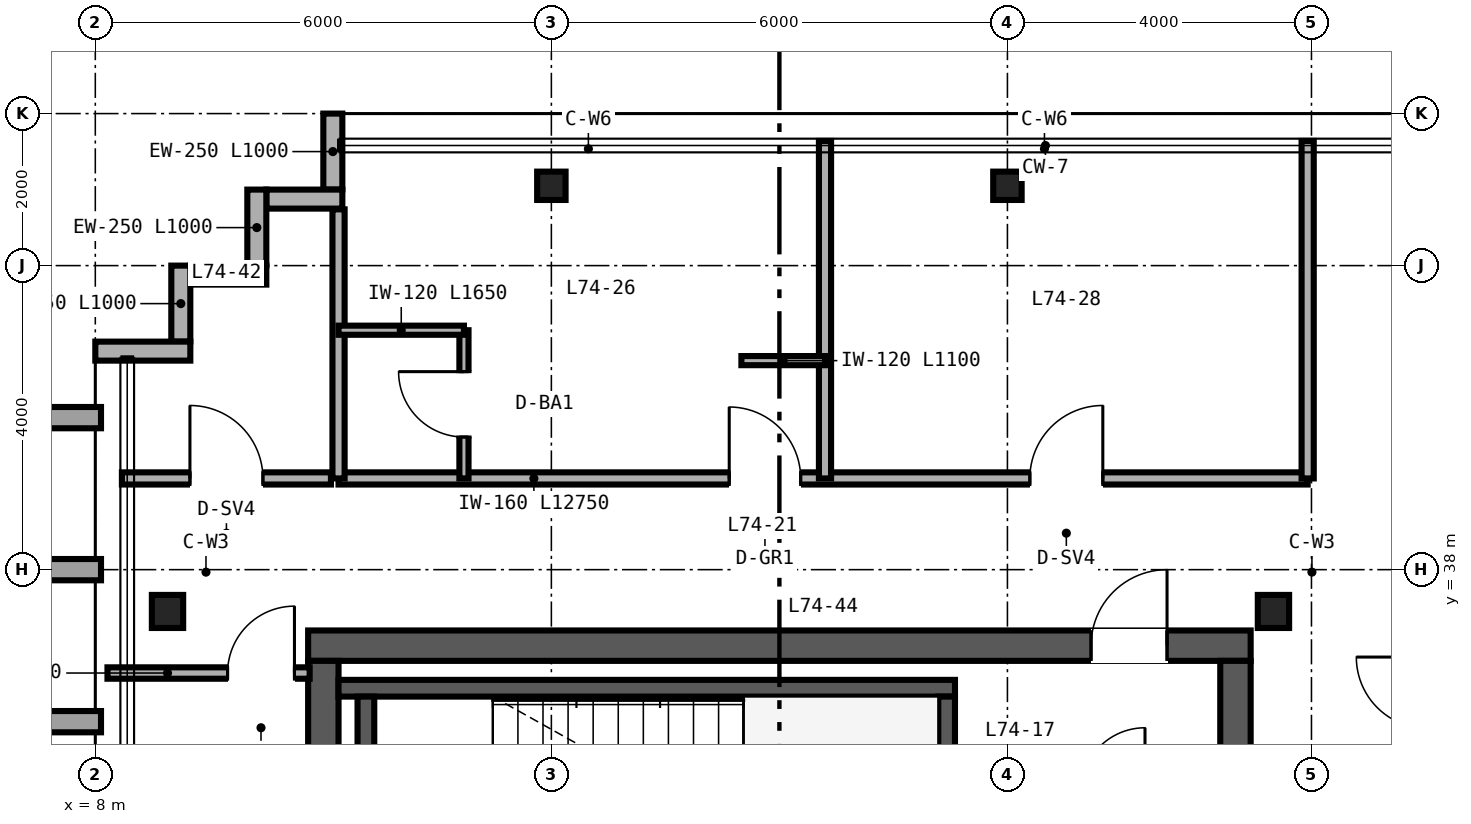
"""IFC4 building model, lengths in metres.
Left out: names, types, materials, properties, quantities, classifications, styles, units other than length and angle.
Written with IfcOpenShell. Run it as: python <this file> out.ifc"""

import sys

from ifc_helpers import new_model, si_unit, direction, frame, frame_2d, origin, origin_2d, place, context, subcontext, project, spatial, rectangle, i_section, extrude, source, transform, mapped, element, fill, save


model = new_model("IFC4")
c1 = context("Model", 3, precision=1e-05, world=origin(), true_north=direction((0.0, 1.0)))
c2 = subcontext(c1, "Body", "Model", "MODEL_VIEW")
j1 = project(units=[si_unit("LENGTHUNIT", "METRE"), si_unit("PLANEANGLEUNIT", "RADIAN")], contexts=[c1])
p1 = place(None, origin())
s1 = spatial("IfcSite", under=j1, at=p1, CompositionType="ELEMENT")
p2 = place(p1, origin())
s2 = spatial("IfcBuilding", under=s1, at=p2, CompositionType="ELEMENT")
p3 = place(p2, frame((0.0, 0.0, 290.4)))
s3 = spatial("IfcBuildingStorey", under=s2, at=p3, CompositionType="ELEMENT", Elevation=290.4)
p4 = place(p3, frame((10.8, 37.0, 0.0), z_axis=(0.0, 0.0, 1.0), x_axis=(1.0, 0.0, 0.0)))
e1 = element("IfcWall", 1, at=p4, inside=s3, PredefinedType="SHEAR", context=c2, shape_type="SweptSolid", body=[
    extrude(rectangle(XDim=12.4, YDim=0.4, at=frame_2d((6.2, 0.0))), origin(), (0.0, 0.0, 1.0), 3.38),
])
p5 = place(p4, frame((10.3, 0.0, 0.0)))
e2 = element("IfcOpeningElement", 2, at=p5, cuts=e1, PredefinedType="OPENING", context=c2, shape_type="SweptSolid", body=[
    extrude(rectangle(XDim=1.0, YDim=2.15, at=frame_2d((0.5, 1.075))), frame((0.0, 0.21, 0.0), z_axis=(0.0, -1.0, 0.0), x_axis=(1.0, 0.0, 0.0)), (0.0, 0.0, 1.0), 0.42),
])
for number, where, z_axis, x_axis in (
    (3, (11.0, 15.2, 0.0), (0.0, 0.0, 1.0), (0.0, 1.0, 0.0)),
    (4, (23.0, 15.2, 0.0), (0.0, 0.0, 1.0), (0.0, 1.0, 0.0)),
):
    element("IfcWall", number, at=place(p3, frame(where, z_axis=z_axis, x_axis=x_axis)), inside=s3, PredefinedType="SHEAR", context=c2, shape_type="SweptSolid", body=[
        extrude(rectangle(XDim=21.6, YDim=0.4, at=frame_2d((10.8, 0.0))), origin(), (0.0, 0.0, 1.0), 3.38),
    ])
p6 = place(p3, frame((11.2, 36.44, 0.0), z_axis=(0.0, 0.0, 1.0), x_axis=(1.0, 0.0, 0.0)))
e5 = element("IfcWall", 5, at=p6, inside=s3, PredefinedType="SHEAR", context=c2, shape_type="SweptSolid", body=[
    extrude(rectangle(XDim=8.11, YDim=0.22, at=frame_2d((4.055, 0.0))), origin(), (0.0, 0.0, 1.0), 3.4),
])
for number, where, z_axis, x_axis in (
    (6, (11.56, 33.05, 0.0), (0.0, 0.0, 1.0), (0.0, 1.0, 0.0)),
    (7, (19.2, 33.05, 0.0), (0.0, 0.0, 1.0), (0.0, 1.0, 0.0)),
):
    element("IfcWall", number, at=place(p3, frame(where, z_axis=z_axis, x_axis=x_axis)), inside=s3, PredefinedType="SHEAR", context=c2, shape_type="SweptSolid", body=[
        extrude(rectangle(XDim=3.28, YDim=0.22, at=frame_2d((1.64, 0.0))), origin(), (0.0, 0.0, 1.0), 3.4),
    ])
m1 = source(origin(), c2, "Body", "SweptSolid", [
    extrude(i_section(OverallWidth=0.412, OverallDepth=0.435, WebThickness=0.036, FlangeThickness=0.057, FilletRadius=0.025, at=origin_2d()), origin(), (0.0, 0.0, 1.0), 3.38),
])
for number, where, z_axis, x_axis in (
    (8, (8.95, 37.45, 0.0), (0.0, 0.0, 1.0), (1.0, 0.0, 0.0)),
    (9, (23.5, 37.45, 0.0), (0.0, 0.0, 1.0), (1.0, 0.0, 0.0)),
):
    element("IfcColumn", number, at=place(p3, frame(where, z_axis=z_axis, x_axis=x_axis)), inside=s3, PredefinedType="COLUMN", context=c2, shape_type="MappedRepresentation", body=[
        mapped(m1, transform((0.0, 0.0, 0.0), scale=1.0)),
    ])
m2 = source(origin(), c2, "Body", "SweptSolid", [
    extrude(i_section(OverallWidth=0.374, OverallDepth=0.373, WebThickness=0.016, FlangeThickness=0.026, FilletRadius=0.025, at=origin_2d()), origin(), (0.0, 0.0, 1.0), 3.38),
])
for number, where, z_axis, x_axis in (
    (10, (14.0, 43.05, 0.0), (0.0, 0.0, 1.0), (1.0, 0.0, 0.0)),
    (11, (20.0, 43.05, 0.0), (0.0, 0.0, 1.0), (1.0, 0.0, 0.0)),
):
    element("IfcColumn", number, at=place(p3, frame(where, z_axis=z_axis, x_axis=x_axis)), inside=s3, PredefinedType="COLUMN", context=c2, shape_type="MappedRepresentation", body=[
        mapped(m2, transform((0.0, 0.0, 0.0), scale=1.0)),
    ])
for number, where, z_axis, x_axis in (
    (12, (11.125, 44.0, 0.0), (0.0, 0.0, 1.0), (0.0, -1.0, 0.0)),
    (13, (11.25, 42.875, 0.0), (0.0, 0.0, 1.0), (-1.0, 0.0, 0.0)),
    (14, (10.125, 43.0, 0.0), (0.0, 0.0, 1.0), (0.0, -1.0, 0.0)),
    (15, (10.25, 41.875, 0.0), (0.0, 0.0, 1.0), (-1.0, 0.0, 0.0)),
    (16, (9.125, 42.0, 0.0), (0.0, 0.0, 1.0), (0.0, -1.0, 0.0)),
):
    element("IfcWall", number, at=place(p3, frame(where, z_axis=z_axis, x_axis=x_axis)), inside=s3, PredefinedType="SOLIDWALL", context=c2, shape_type="SweptSolid", body=[
        extrude(rectangle(XDim=1.0, YDim=0.25, at=frame_2d((0.5, 0.0))), origin(), (0.0, 0.0, 1.0), 3.38),
    ])
p7 = place(p3, frame((9.25, 40.875, 0.0), z_axis=(0.0, 0.0, 1.0), x_axis=(-1.0, 0.0, 0.0)))
e17 = element("IfcWall", 17, at=p7, inside=s3, PredefinedType="SOLIDWALL", context=c2, shape_type="SweptSolid", body=[
    extrude(rectangle(XDim=1.25, YDim=0.25, at=frame_2d((0.625, 0.0))), origin(), (0.0, 0.0, 1.0), 3.38),
])
p8 = place(p3, frame((11.2, 39.2, 0.0), z_axis=(0.0, 0.0, 1.0), x_axis=(1.0, 0.0, 0.0)))
e18 = element("IfcWall", 18, at=p8, inside=s3, PredefinedType="PARTITIONING", context=c2, shape_type="SweptSolid", body=[
    extrude(rectangle(XDim=12.75, YDim=0.16, at=frame_2d((6.375, 0.0))), origin(), (0.0, 0.0, 1.0), 3.38),
])
p9 = place(p8, frame((5.14, 0.0, 0.0)))
e19 = element("IfcOpeningElement", 19, at=p9, cuts=e18, PredefinedType="OPENING", context=c2, shape_type="SweptSolid", body=[
    extrude(rectangle(XDim=0.94, YDim=2.15, at=frame_2d((0.47, 1.075))), frame((0.0, 0.09, 0.0), z_axis=(0.0, -1.0, 0.0), x_axis=(1.0, 0.0, 0.0)), (0.0, 0.0, 1.0), 0.18),
])
p10 = place(p8, frame((9.095, 0.0, 0.0)))
e20 = element("IfcOpeningElement", 20, at=p10, cuts=e18, PredefinedType="OPENING", context=c2, shape_type="SweptSolid", body=[
    extrude(rectangle(XDim=0.96, YDim=2.15, at=frame_2d((0.48, 1.075))), frame((0.0, 0.09, 0.0), z_axis=(0.0, -1.0, 0.0), x_axis=(1.0, 0.0, 0.0)), (0.0, 0.0, 1.0), 0.18),
])
p11 = place(p3, frame((11.2, 39.2, 0.0), z_axis=(0.0, 0.0, 1.0), x_axis=(0.0, 1.0, 0.0)))
e21 = element("IfcWall", 21, at=p11, inside=s3, PredefinedType="PARTITIONING", context=c2, shape_type="SweptSolid", body=[
    extrude(rectangle(XDim=3.54, YDim=0.16, at=frame_2d((1.77, 0.0))), origin(), (0.0, 0.0, 1.0), 3.38),
])
p12 = place(p3, frame((23.95, 39.2, 0.0), z_axis=(0.0, 0.0, 1.0), x_axis=(0.0, 1.0, 0.0)))
e22 = element("IfcWall", 22, at=p12, inside=s3, PredefinedType="PARTITIONING", context=c2, shape_type="SweptSolid", body=[
    extrude(rectangle(XDim=4.44, YDim=0.16, at=frame_2d((2.22, 0.0))), origin(), (0.0, 0.0, 1.0), 3.38),
])
p13 = place(p3, frame((17.6, 39.2, 0.0), z_axis=(0.0, 0.0, 1.0), x_axis=(0.0, 1.0, 0.0)))
e23 = element("IfcWall", 23, at=p13, inside=s3, PredefinedType="PARTITIONING", context=c2, shape_type="SweptSolid", body=[
    extrude(rectangle(XDim=4.44, YDim=0.16, at=frame_2d((2.22, 0.0))), origin(), (0.0, 0.0, 1.0), 2.687),
])
p14 = place(p3, frame((12.85, 39.2, 0.0), z_axis=(0.0, 0.0, 1.0), x_axis=(0.0, 1.0, 0.0)))
e24 = element("IfcWall", 24, at=p14, inside=s3, PredefinedType="PARTITIONING", context=c2, shape_type="SweptSolid", body=[
    extrude(rectangle(XDim=1.95, YDim=0.12, at=frame_2d((0.975, 0.0))), origin(), (0.0, 0.0, 1.0), 3.38),
])
p15 = place(p14, frame((0.545, 0.0, 0.0)))
e25 = element("IfcOpeningElement", 25, at=p15, cuts=e24, PredefinedType="OPENING", context=c2, shape_type="SweptSolid", body=[
    extrude(rectangle(XDim=0.86, YDim=2.1, at=frame_2d((0.43, 1.05))), frame((0.0, 0.07, 0.0), z_axis=(0.0, -1.0, 0.0), x_axis=(1.0, 0.0, 0.0)), (0.0, 0.0, 1.0), 0.14),
])
p16 = place(p3, frame((11.2, 41.15, 0.0), z_axis=(0.0, 0.0, 1.0), x_axis=(1.0, 0.0, 0.0)))
e26 = element("IfcWall", 26, at=p16, inside=s3, PredefinedType="PARTITIONING", context=c2, shape_type="SweptSolid", body=[
    extrude(rectangle(XDim=1.65, YDim=0.12, at=frame_2d((0.825, 0.0))), origin(), (0.0, 0.0, 1.0), 3.38),
])
p17 = place(p3, frame((16.5, 40.75, 0.0), z_axis=(0.0, 0.0, 1.0), x_axis=(1.0, 0.0, 0.0)))
e27 = element("IfcWall", 27, at=p17, inside=s3, PredefinedType="PARTITIONING", context=c2, shape_type="SweptSolid", body=[
    extrude(rectangle(XDim=1.1, YDim=0.12, at=frame_2d((0.55, 0.0))), origin(), (0.0, 0.0, 1.0), 3.38),
])
p18 = place(p3, frame((8.16, 36.64, 0.0), z_axis=(0.0, 0.0, 1.0), x_axis=(1.0, 0.0, 0.0)))
e28 = element("IfcWall", 28, at=p18, inside=s3, PredefinedType="PARTITIONING", context=c2, shape_type="SweptSolid", body=[
    extrude(rectangle(XDim=2.66, YDim=0.15, at=frame_2d((1.33, 0.0))), origin(), (0.0, 0.0, 1.0), 2.763),
])
p19 = place(p18, frame((1.58, 0.0, 0.0)))
e29 = element("IfcOpeningElement", 29, at=p19, cuts=e28, PredefinedType="OPENING", context=c2, shape_type="SweptSolid", body=[
    extrude(rectangle(XDim=0.88, YDim=2.15, at=frame_2d((0.44, 1.075))), frame((0.0, 0.085, 0.0), z_axis=(0.0, -1.0, 0.0), x_axis=(1.0, 0.0, 0.0)), (0.0, 0.0, 1.0), 0.17),
])
p20 = place(p3, frame((8.35, 39.2, 0.0), z_axis=(0.0, 0.0, 1.0), x_axis=(1.0, 0.0, 0.0)))
e30 = element("IfcWall", 30, at=p20, inside=s3, PredefinedType="PARTITIONING", context=c2, shape_type="SweptSolid", body=[
    extrude(rectangle(XDim=2.75, YDim=0.16, at=frame_2d((1.375, 0.0))), origin(), (0.0, 0.0, 1.0), 3.38),
])
p21 = place(p20, frame((0.895, 0.0, 0.0)))
e31 = element("IfcOpeningElement", 31, at=p21, cuts=e30, PredefinedType="OPENING", context=c2, shape_type="SweptSolid", body=[
    extrude(rectangle(XDim=0.96, YDim=2.15, at=frame_2d((0.48, 1.075))), frame((0.0, 0.09, 0.0), z_axis=(0.0, -1.0, 0.0), x_axis=(1.0, 0.0, 0.0)), (0.0, 0.0, 1.0), 0.18),
])
m3 = source(origin(), c2, "Body", "SweptSolid", [
    extrude(rectangle(XDim=1.0, YDim=2.15, at=frame_2d((0.5, 1.075))), frame((0.0, 0.025, 0.0), z_axis=(0.0, -1.0, 0.0), x_axis=(1.0, 0.0, 0.0)), (0.0, 0.0, 1.0), 0.05),
])
p22 = place(p5, origin())
e32 = element("IfcDoor", 32, at=p22, inside=s3, OperationType="SINGLE_SWING_RIGHT", PredefinedType="DOOR", context=c2, shape_type="MappedRepresentation", body=[
    mapped(m3, transform((0.0, 0.0, 0.0), scale=1.0)),
])
fill(e2, e32)
m4 = source(origin(), c2, "Body", "SweptSolid", [
    extrude(rectangle(XDim=0.86, YDim=2.1, at=frame_2d((0.43, 1.05))), frame((0.0, 0.025, 0.0), z_axis=(0.0, -1.0, 0.0), x_axis=(1.0, 0.0, 0.0)), (0.0, 0.0, 1.0), 0.05),
])
p23 = place(p15, origin())
e33 = element("IfcDoor", 33, at=p23, inside=s3, OperationType="SINGLE_SWING_RIGHT", PredefinedType="DOOR", context=c2, shape_type="MappedRepresentation", body=[
    mapped(m4, transform((0.0, 0.0, 0.0), scale=1.0)),
])
fill(e25, e33)
m5 = source(origin(), c2, "Body", "SweptSolid", [
    extrude(rectangle(XDim=0.94, YDim=2.15, at=frame_2d((0.47, 1.075))), frame((0.0, 0.025, 0.0), z_axis=(0.0, -1.0, 0.0), x_axis=(1.0, 0.0, 0.0)), (0.0, 0.0, 1.0), 0.05),
])
p24 = place(p9, origin())
e34 = element("IfcDoor", 34, at=p24, inside=s3, OperationType="SINGLE_SWING_LEFT", PredefinedType="DOOR", context=c2, shape_type="MappedRepresentation", body=[
    mapped(m5, transform((0.0, 0.0, 0.0), scale=1.0)),
])
fill(e19, e34)
m6 = source(origin(), c2, "Body", "SweptSolid", [
    extrude(rectangle(XDim=0.96, YDim=2.15, at=frame_2d((0.48, 1.075))), frame((0.0, 0.025, 0.0), z_axis=(0.0, -1.0, 0.0), x_axis=(1.0, 0.0, 0.0)), (0.0, 0.0, 1.0), 0.05),
])
p25 = place(p10, origin())
e35 = element("IfcDoor", 35, at=p25, inside=s3, OperationType="SINGLE_SWING_RIGHT", PredefinedType="DOOR", context=c2, shape_type="MappedRepresentation", body=[
    mapped(m6, transform((0.0, 0.0, 0.0), scale=1.0)),
])
fill(e20, e35)
m7 = source(origin(), c2, "Body", "SweptSolid", [
    extrude(rectangle(XDim=0.88, YDim=2.15, at=frame_2d((0.44, 1.075))), frame((0.0, 0.025, 0.0), z_axis=(0.0, -1.0, 0.0), x_axis=(1.0, 0.0, 0.0)), (0.0, 0.0, 1.0), 0.05),
])
p26 = place(p19, origin())
e36 = element("IfcDoor", 36, at=p26, inside=s3, OperationType="SINGLE_SWING_RIGHT", PredefinedType="DOOR", context=c2, shape_type="MappedRepresentation", body=[
    mapped(m7, transform((0.0, 0.0, 0.0), scale=1.0)),
])
fill(e29, e36)
p27 = place(p21, origin())
e37 = element("IfcDoor", 37, at=p27, inside=s3, OperationType="SINGLE_SWING_LEFT", PredefinedType="DOOR", context=c2, shape_type="MappedRepresentation", body=[
    mapped(m6, transform((0.0, 0.0, 0.0), scale=1.0)),
])
fill(e31, e37)
save(model, sys.argv[1])
